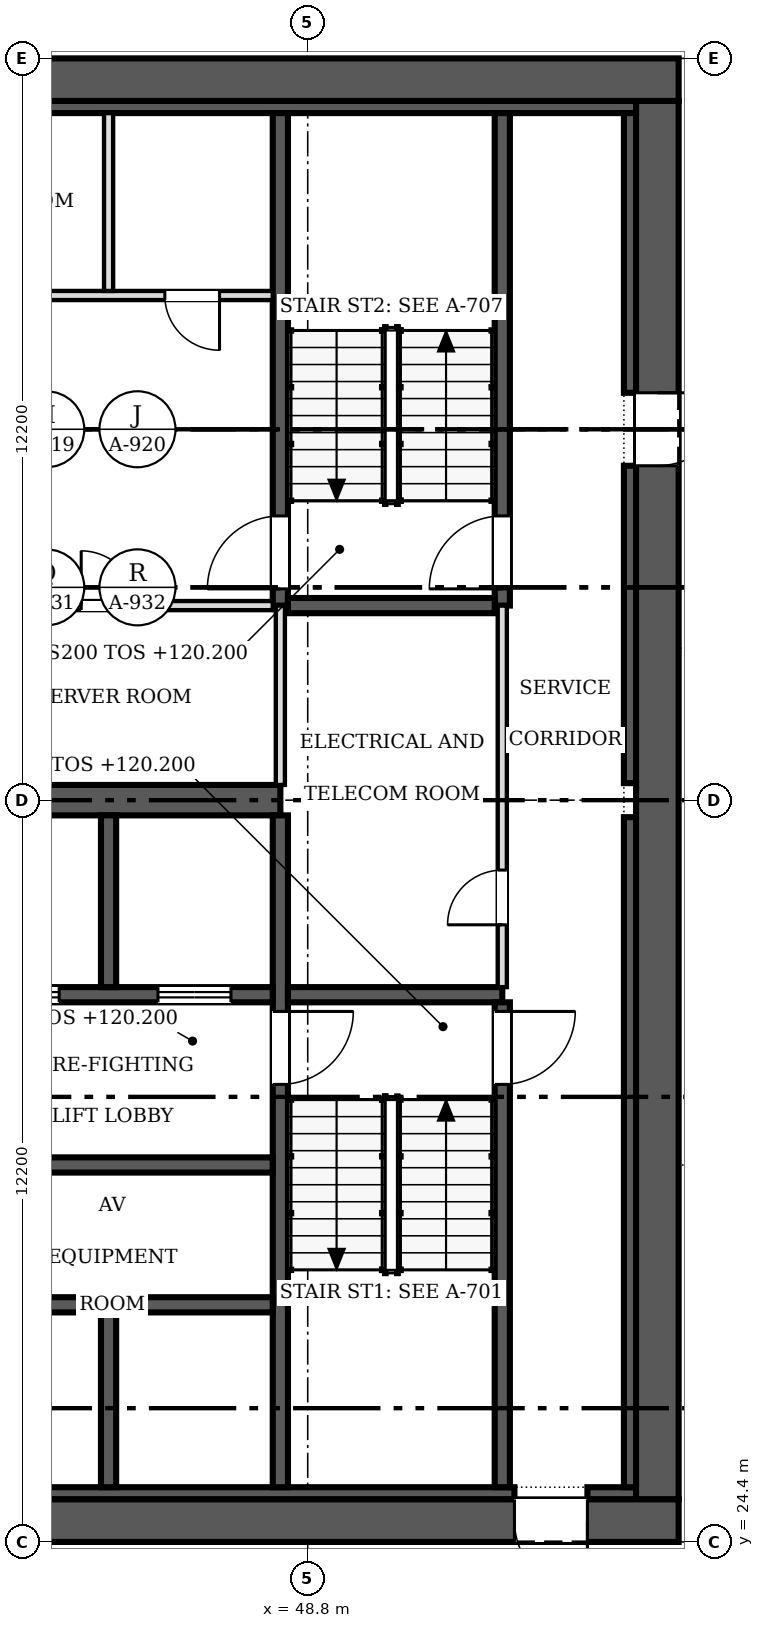
"""IFC4 building model, lengths in metres.
Left out: names, types, materials, properties, quantities, classifications, styles, units other than length and angle.
Written with IfcOpenShell. Run it as: python <this file> out.ifc"""

import sys

from ifc_helpers import new_model, si_unit, direction, frame, frame_2d, origin, place, context, subcontext, project, spatial, rectangle, extrude, source, transform, mapped, element, fill, save


model = new_model("IFC4")
c1 = context("Model", 3, precision=1e-05, world=origin(), true_north=direction((0.0, 1.0)))
c2 = subcontext(c1, "Body", "Model", "MODEL_VIEW")
j1 = project(units=[si_unit("LENGTHUNIT", "METRE"), si_unit("PLANEANGLEUNIT", "RADIAN")], contexts=[c1])
p1 = place(None, origin())
s1 = spatial("IfcSite", under=j1, at=p1, CompositionType="ELEMENT")
p2 = place(p1, origin())
s2 = spatial("IfcBuilding", under=s1, at=p2, CompositionType="ELEMENT")
p3 = place(p2, frame((0.0, 0.0, 120.2)))
s3 = spatial("IfcBuildingStorey", under=s2, at=p3, CompositionType="ELEMENT", Elevation=120.2)
p4 = place(p3, frame((54.9, 24.75, 0.0), z_axis=(0.0, 0.0, 1.0), x_axis=(-1.0, 0.0, 0.0)))
e1 = element("IfcWall", 1, at=p4, inside=s3, PredefinedType="SHEAR", context=c2, shape_type="SweptSolid", body=[
    extrude(rectangle(XDim=24.4, YDim=0.7, at=frame_2d((12.2, 0.0))), origin(), (0.0, 0.0, 1.0), 3.8),
])
m1 = source(origin(), c2, "Body", "SweptSolid", [
    extrude(rectangle(XDim=1.2, YDim=2.1, at=frame_2d((0.6, 1.05))), frame((0.0, 0.36, 0.0), z_axis=(0.0, -1.0, 0.0), x_axis=(1.0, 0.0, 0.0)), (0.0, 0.0, 1.0), 0.72),
])
p5 = place(p4, frame((1.5, 0.0, 0.0)))
e2 = element("IfcOpeningElement", 2, at=p5, cuts=e1, PredefinedType="OPENING", context=c2, shape_type="MappedRepresentation", body=[
    mapped(m1, transform((0.0, 0.0, 0.0), scale=1.0)),
])
p6 = place(p3, frame((30.5, 48.45, 0.0), z_axis=(0.0, 0.0, 1.0), x_axis=(1.0, 0.0, 0.0)))
e3 = element("IfcWall", 3, at=p6, inside=s3, PredefinedType="SHEAR", context=c2, shape_type="SweptSolid", body=[
    extrude(rectangle(XDim=24.4, YDim=0.7, at=frame_2d((12.2, 0.0))), origin(), (0.0, 0.0, 1.0), 3.8),
])
p7 = place(p3, frame((54.55, 48.1, 0.0), z_axis=(0.0, 0.0, 1.0), x_axis=(0.0, -1.0, 0.0)))
e4 = element("IfcWall", 4, at=p7, inside=s3, PredefinedType="SHEAR", context=c2, shape_type="SweptSolid", body=[
    extrude(rectangle(XDim=23.0, YDim=0.7, at=frame_2d((11.5, 0.0))), origin(), (0.0, 0.0, 1.0), 3.8),
])
p8 = place(p7, frame((4.8, 0.0, 0.0)))
e5 = element("IfcOpeningElement", 5, at=p8, cuts=e4, PredefinedType="OPENING", context=c2, shape_type="MappedRepresentation", body=[
    mapped(m1, transform((0.0, 0.0, 0.0), scale=1.0)),
])
p9 = place(p3, frame((31.2, 25.2, 0.0), z_axis=(0.0, 0.0, 1.0), x_axis=(1.0, 0.0, 0.0)))
e6 = element("IfcWall", 6, at=p9, inside=s3, PredefinedType="SOLIDWALL", context=c2, shape_type="SweptSolid", body=[
    extrude(rectangle(XDim=21.0, YDim=0.2, at=frame_2d((10.5, 0.0))), origin(), (0.0, 0.0, 1.0), 3.8),
])
p10 = place(p3, frame((53.4, 25.2, 0.0), z_axis=(0.0, 0.0, 1.0), x_axis=(1.0, 0.0, 0.0)))
e7 = element("IfcWall", 7, at=p10, inside=s3, PredefinedType="SOLIDWALL", context=c2, shape_type="SweptSolid", body=[
    extrude(rectangle(XDim=0.8, YDim=0.2, at=frame_2d((0.4, 0.0))), origin(), (0.0, 0.0, 1.0), 3.8),
])
p11 = place(p3, frame((31.2, 48.0, 0.0), z_axis=(0.0, 0.0, 1.0), x_axis=(1.0, 0.0, 0.0)))
e8 = element("IfcWall", 8, at=p11, inside=s3, PredefinedType="SOLIDWALL", context=c2, shape_type="SweptSolid", body=[
    extrude(rectangle(XDim=23.0, YDim=0.2, at=frame_2d((11.5, 0.0))), origin(), (0.0, 0.0, 1.0), 3.8),
])
p12 = place(p3, frame((54.1, 25.3, 0.0), z_axis=(0.0, 0.0, 1.0), x_axis=(0.0, 1.0, 0.0)))
e9 = element("IfcWall", 9, at=p12, inside=s3, PredefinedType="SOLIDWALL", context=c2, shape_type="SweptSolid", body=[
    extrude(rectangle(XDim=11.02, YDim=0.2, at=frame_2d((5.51, 0.0))), origin(), (0.0, 0.0, 1.0), 3.8),
])
p13 = place(p3, frame((54.1, 36.88, 0.0), z_axis=(0.0, 0.0, 1.0), x_axis=(0.0, 1.0, 0.0)))
e10 = element("IfcWall", 10, at=p13, inside=s3, PredefinedType="SOLIDWALL", context=c2, shape_type="SweptSolid", body=[
    extrude(rectangle(XDim=5.22, YDim=0.2, at=frame_2d((2.61, 0.0))), origin(), (0.0, 0.0, 1.0), 3.8),
])
p14 = place(p3, frame((54.1, 43.3, 0.0), z_axis=(0.0, 0.0, 1.0), x_axis=(0.0, 1.0, 0.0)))
e11 = element("IfcWall", 11, at=p14, inside=s3, PredefinedType="SOLIDWALL", context=c2, shape_type="SweptSolid", body=[
    extrude(rectangle(XDim=4.6, YDim=0.2, at=frame_2d((2.3, 0.0))), origin(), (0.0, 0.0, 1.0), 3.8),
])
p15 = place(p3, frame((31.4, 36.6, 0.0), z_axis=(0.0, 0.0, 1.0), x_axis=(1.0, 0.0, 0.0)))
e12 = element("IfcWall", 12, at=p15, inside=s3, PredefinedType="SHEAR", context=c2, shape_type="SweptSolid", body=[
    extrude(rectangle(XDim=16.95, YDim=0.5, at=frame_2d((8.475, 0.0))), origin(), (0.0, 0.0, 1.0), 3.8),
])
p16 = place(p3, frame((48.35, 36.35, 0.0), z_axis=(0.0, 0.0, 1.0), x_axis=(0.0, -1.0, 0.0)))
e13 = element("IfcWall", 13, at=p16, inside=s3, PredefinedType="SOLIDWALL", context=c2, shape_type="SweptSolid", body=[
    extrude(rectangle(XDim=11.05, YDim=0.25, at=frame_2d((5.525, 0.0))), origin(), (0.0, 0.0, 1.0), 3.8),
])
m2 = source(origin(), c2, "Body", "SweptSolid", [
    extrude(rectangle(XDim=1.2, YDim=2.1, at=frame_2d((0.6, 1.05))), frame((0.0, 0.135, 0.0), z_axis=(0.0, -1.0, 0.0), x_axis=(1.0, 0.0, 0.0)), (0.0, 0.0, 1.0), 0.27),
])
p17 = place(p16, frame((3.225, 0.0, 0.0)))
e14 = element("IfcOpeningElement", 14, at=p17, cuts=e13, PredefinedType="OPENING", context=c2, shape_type="MappedRepresentation", body=[
    mapped(m2, transform((0.0, 0.0, 0.0), scale=1.0)),
])
p18 = place(p3, frame((48.225, 33.4, 0.0), z_axis=(0.0, 0.0, 1.0), x_axis=(-1.0, 0.0, 0.0)))
e15 = element("IfcWall", 15, at=p18, inside=s3, PredefinedType="SOLIDWALL", context=c2, shape_type="SweptSolid", body=[
    extrude(rectangle(XDim=5.275, YDim=0.25, at=frame_2d((2.638, 0.0))), origin(), (0.0, 0.0, 1.0), 3.8),
])
p19 = place(p18, frame((3.512, 0.0, 0.0)))
e16 = element("IfcOpeningElement", 16, at=p19, cuts=e15, PredefinedType="OPENING", context=c2, shape_type="MappedRepresentation", body=[
    mapped(m2, transform((0.0, 0.0, 0.0), scale=1.0)),
])
p20 = place(p18, frame((0.688, 0.0, 0.0)))
e17 = element("IfcOpeningElement", 17, at=p20, cuts=e15, PredefinedType="OPENING", context=c2, shape_type="MappedRepresentation", body=[
    mapped(m2, transform((0.0, 0.0, 0.0), scale=1.0)),
])
p21 = place(p3, frame((48.475, 33.4, 0.0), z_axis=(0.0, 0.0, 1.0), x_axis=(1.0, 0.0, 0.0)))
e18 = element("IfcWall", 18, at=p21, inside=s3, PredefinedType="SOLIDWALL", context=c2, shape_type="SweptSolid", body=[
    extrude(rectangle(XDim=3.525, YDim=0.25, at=frame_2d((1.762, 0.0))), origin(), (0.0, 0.0, 1.0), 3.8),
])
p22 = place(p3, frame((48.35, 47.9, 0.0), z_axis=(0.0, 0.0, 1.0), x_axis=(0.0, -1.0, 0.0)))
e19 = element("IfcWall", 19, at=p22, inside=s3, PredefinedType="SOLIDWALL", context=c2, shape_type="SweptSolid", body=[
    extrude(rectangle(XDim=8.1, YDim=0.25, at=frame_2d((4.05, 0.0))), origin(), (0.0, 0.0, 1.0), 3.8),
])
p23 = place(p22, frame((6.625, 0.0, 0.0)))
e20 = element("IfcOpeningElement", 20, at=p23, cuts=e19, PredefinedType="OPENING", context=c2, shape_type="MappedRepresentation", body=[
    mapped(m2, transform((0.0, 0.0, 0.0), scale=1.0)),
])
p24 = place(p3, frame((52.0, 25.3, 0.0), z_axis=(0.0, 0.0, 1.0), x_axis=(0.0, 1.0, 0.0)))
e21 = element("IfcWall", 21, at=p24, inside=s3, PredefinedType="SOLIDWALL", context=c2, shape_type="SweptSolid", body=[
    extrude(rectangle(XDim=7.975, YDim=0.25, at=frame_2d((3.987, 0.0))), origin(), (0.0, 0.0, 1.0), 3.8),
])
p25 = place(p24, frame((6.625, 0.0, 0.0)))
e22 = element("IfcOpeningElement", 22, at=p25, cuts=e21, PredefinedType="OPENING", context=c2, shape_type="MappedRepresentation", body=[
    mapped(m2, transform((0.0, 0.0, 0.0), scale=1.0)),
])
p26 = place(p3, frame((52.0, 39.8, 0.0), z_axis=(0.0, 0.0, 1.0), x_axis=(0.0, 1.0, 0.0)))
e23 = element("IfcWall", 23, at=p26, inside=s3, PredefinedType="SOLIDWALL", context=c2, shape_type="SweptSolid", body=[
    extrude(rectangle(XDim=8.1, YDim=0.25, at=frame_2d((4.05, 0.0))), origin(), (0.0, 0.0, 1.0), 3.8),
])
p27 = place(p26, frame((0.275, 0.0, 0.0)))
e24 = element("IfcOpeningElement", 24, at=p27, cuts=e23, PredefinedType="OPENING", context=c2, shape_type="MappedRepresentation", body=[
    mapped(m2, transform((0.0, 0.0, 0.0), scale=1.0)),
])
for number, where, z_axis, x_axis in (
    (25, (42.95, 28.3, 0.0), (0.0, 0.0, 1.0), (1.0, 0.0, 0.0)),
    (26, (42.95, 30.6, 0.0), (0.0, 0.0, 1.0), (1.0, 0.0, 0.0)),
):
    element("IfcWall", number, at=place(p3, frame(where, z_axis=z_axis, x_axis=x_axis)), inside=s3, PredefinedType="SOLIDWALL", context=c2, shape_type="SweptSolid", body=[
        extrude(rectangle(XDim=5.275, YDim=0.25, at=frame_2d((2.638, 0.0))), origin(), (0.0, 0.0, 1.0), 3.8),
    ])
p28 = place(p3, frame((48.475, 39.8, 0.0), z_axis=(0.0, 0.0, 1.0), x_axis=(1.0, 0.0, 0.0)))
e27 = element("IfcWall", 27, at=p28, inside=s3, PredefinedType="SOLIDWALL", context=c2, shape_type="SweptSolid", body=[
    extrude(rectangle(XDim=3.4, YDim=0.25, at=frame_2d((1.7, 0.0))), origin(), (0.0, 0.0, 1.0), 3.8),
])
p29 = place(p3, frame((45.525, 33.525, 0.0), z_axis=(0.0, 0.0, 1.0), x_axis=(0.0, 1.0, 0.0)))
e28 = element("IfcWall", 28, at=p29, inside=s3, PredefinedType="SOLIDWALL", context=c2, shape_type="SweptSolid", body=[
    extrude(rectangle(XDim=2.825, YDim=0.25, at=frame_2d((1.413, 0.0))), origin(), (0.0, 0.0, 1.0), 3.8),
])
p30 = place(p3, frame((45.525, 25.3, 0.0), z_axis=(0.0, 0.0, 1.0), x_axis=(0.0, 1.0, 0.0)))
e29 = element("IfcWall", 29, at=p30, inside=s3, PredefinedType="SOLIDWALL", context=c2, shape_type="SweptSolid", body=[
    extrude(rectangle(XDim=2.875, YDim=0.25, at=frame_2d((1.438, 0.0))), origin(), (0.0, 0.0, 1.0), 3.8),
])
p31 = place(p3, frame((52.0, 33.525, 0.0), z_axis=(0.0, 0.0, 1.0), x_axis=(0.0, 1.0, 0.0)))
e30 = element("IfcWall", 30, at=p31, inside=s3, PredefinedType="PARTITIONING", context=c2, shape_type="SweptSolid", body=[
    extrude(rectangle(XDim=6.275, YDim=0.15, at=frame_2d((3.138, 0.0))), origin(), (0.0, 0.0, 1.0), 3.6),
])
m3 = source(origin(), c2, "Body", "SweptSolid", [
    extrude(rectangle(XDim=0.9, YDim=2.1, at=frame_2d((0.45, 1.05))), frame((0.0, 0.085, 0.0), z_axis=(0.0, -1.0, 0.0), x_axis=(1.0, 0.0, 0.0)), (0.0, 0.0, 1.0), 0.17),
])
p32 = place(p31, frame((1.025, 0.0, 0.0)))
e31 = element("IfcOpeningElement", 31, at=p32, cuts=e30, PredefinedType="OPENING", context=c2, shape_type="MappedRepresentation", body=[
    mapped(m3, transform((0.0, 0.0, 0.0), scale=1.0)),
])
p33 = place(p3, frame((48.225, 39.8, 0.0), z_axis=(0.0, 0.0, 1.0), x_axis=(-1.0, 0.0, 0.0)))
e32 = element("IfcWall", 32, at=p33, inside=s3, PredefinedType="PARTITIONING", context=c2, shape_type="SweptSolid", body=[
    extrude(rectangle(XDim=5.275, YDim=0.15, at=frame_2d((2.638, 0.0))), origin(), (0.0, 0.0, 1.0), 3.6),
])
p34 = place(p33, frame((2.25, 0.0, 0.0)))
e33 = element("IfcOpeningElement", 33, at=p34, cuts=e32, PredefinedType="OPENING", context=c2, shape_type="MappedRepresentation", body=[
    mapped(m3, transform((0.0, 0.0, 0.0), scale=1.0)),
])
p35 = place(p3, frame((42.95, 44.9, 0.0), z_axis=(0.0, 0.0, 1.0), x_axis=(1.0, 0.0, 0.0)))
e34 = element("IfcWall", 34, at=p35, inside=s3, PredefinedType="PARTITIONING", context=c2, shape_type="SweptSolid", body=[
    extrude(rectangle(XDim=5.275, YDim=0.15, at=frame_2d((2.638, 0.0))), origin(), (0.0, 0.0, 1.0), 3.6),
])
p36 = place(p35, frame((0.712, 0.0, 0.0)))
e35 = element("IfcOpeningElement", 35, at=p36, cuts=e34, PredefinedType="OPENING", context=c2, shape_type="MappedRepresentation", body=[
    mapped(m3, transform((0.0, 0.0, 0.0), scale=1.0)),
])
p37 = place(p35, frame((3.5, 0.0, 0.0)))
e36 = element("IfcOpeningElement", 36, at=p37, cuts=e34, PredefinedType="OPENING", context=c2, shape_type="MappedRepresentation", body=[
    mapped(m3, transform((0.0, 0.0, 0.0), scale=1.0)),
])
p38 = place(p3, frame((48.35, 36.85, 0.0), z_axis=(0.0, 0.0, 1.0), x_axis=(0.0, 1.0, 0.0)))
e37 = element("IfcWall", 37, at=p38, inside=s3, PredefinedType="PARTITIONING", context=c2, shape_type="SweptSolid", body=[
    extrude(rectangle(XDim=2.95, YDim=0.15, at=frame_2d((1.475, 0.0))), origin(), (0.0, 0.0, 1.0), 3.6),
])
p39 = place(p3, frame((45.525, 44.975, 0.0), z_axis=(0.0, 0.0, 1.0), x_axis=(0.0, 1.0, 0.0)))
e38 = element("IfcWall", 38, at=p39, inside=s3, PredefinedType="PARTITIONING", context=c2, shape_type="SweptSolid", body=[
    extrude(rectangle(XDim=2.925, YDim=0.15, at=frame_2d((1.462, 0.0))), origin(), (0.0, 0.0, 1.0), 3.6),
])
m4 = source(origin(), c2, "Body", "SweptSolid", [
    extrude(rectangle(XDim=1.2, YDim=2.1, at=frame_2d((0.6, 1.05))), frame((0.0, 0.025, 0.0), z_axis=(0.0, -1.0, 0.0), x_axis=(1.0, 0.0, 0.0)), (0.0, 0.0, 1.0), 0.05),
])
p40 = place(p5, origin())
e39 = element("IfcDoor", 39, at=p40, inside=s3, OperationType="SINGLE_SWING_LEFT", PredefinedType="DOOR", context=c2, shape_type="MappedRepresentation", body=[
    mapped(m4, transform((0.0, 0.0, 0.0), scale=1.0)),
])
fill(e2, e39)
p41 = place(p8, origin())
e40 = element("IfcDoor", 40, at=p41, inside=s3, OperationType="SINGLE_SWING_LEFT", PredefinedType="DOOR", context=c2, shape_type="MappedRepresentation", body=[
    mapped(m4, transform((0.0, 0.0, 0.0), scale=1.0)),
])
fill(e5, e40)
p42 = place(p17, origin())
e41 = element("IfcDoor", 41, at=p42, inside=s3, OperationType="SINGLE_SWING_LEFT", PredefinedType="DOOR", context=c2, shape_type="MappedRepresentation", body=[
    mapped(m4, transform((0.0, 0.0, 0.0), scale=1.0)),
])
fill(e14, e41)
p43 = place(p19, origin())
e42 = element("IfcDoor", 42, at=p43, inside=s3, OperationType="DOUBLE_DOOR_SLIDING", PredefinedType="DOOR", context=c2, shape_type="MappedRepresentation", body=[
    mapped(m4, transform((0.0, 0.0, 0.0), scale=1.0)),
])
fill(e16, e42)
p44 = place(p20, origin())
e43 = element("IfcDoor", 43, at=p44, inside=s3, OperationType="DOUBLE_DOOR_SLIDING", PredefinedType="DOOR", context=c2, shape_type="MappedRepresentation", body=[
    mapped(m4, transform((0.0, 0.0, 0.0), scale=1.0)),
])
fill(e17, e43)
p45 = place(p23, origin())
e44 = element("IfcDoor", 44, at=p45, inside=s3, OperationType="SINGLE_SWING_RIGHT", PredefinedType="DOOR", context=c2, shape_type="MappedRepresentation", body=[
    mapped(m4, transform((0.0, 0.0, 0.0), scale=1.0)),
])
fill(e20, e44)
p46 = place(p25, origin())
e45 = element("IfcDoor", 45, at=p46, inside=s3, OperationType="SINGLE_SWING_RIGHT", PredefinedType="DOOR", context=c2, shape_type="MappedRepresentation", body=[
    mapped(m4, transform((0.0, 0.0, 0.0), scale=1.0)),
])
fill(e22, e45)
p47 = place(p27, origin())
e46 = element("IfcDoor", 46, at=p47, inside=s3, OperationType="SINGLE_SWING_LEFT", PredefinedType="DOOR", context=c2, shape_type="MappedRepresentation", body=[
    mapped(m4, transform((0.0, 0.0, 0.0), scale=1.0)),
])
fill(e24, e46)
m5 = source(origin(), c2, "Body", "SweptSolid", [
    extrude(rectangle(XDim=0.9, YDim=2.1, at=frame_2d((0.45, 1.05))), frame((0.0, 0.025, 0.0), z_axis=(0.0, -1.0, 0.0), x_axis=(1.0, 0.0, 0.0)), (0.0, 0.0, 1.0), 0.05),
])
p48 = place(p32, origin())
e47 = element("IfcDoor", 47, at=p48, inside=s3, OperationType="SINGLE_SWING_LEFT", PredefinedType="DOOR", context=c2, shape_type="MappedRepresentation", body=[
    mapped(m5, transform((0.0, 0.0, 0.0), scale=1.0)),
])
fill(e31, e47)
p49 = place(p34, origin())
e48 = element("IfcDoor", 48, at=p49, inside=s3, OperationType="SINGLE_SWING_RIGHT", PredefinedType="DOOR", context=c2, shape_type="MappedRepresentation", body=[
    mapped(m5, transform((0.0, 0.0, 0.0), scale=1.0)),
])
fill(e33, e48)
p50 = place(p37, origin())
e49 = element("IfcDoor", 49, at=p50, inside=s3, OperationType="SINGLE_SWING_RIGHT", PredefinedType="DOOR", context=c2, shape_type="MappedRepresentation", body=[
    mapped(m5, transform((0.0, 0.0, 0.0), scale=1.0)),
])
fill(e36, e49)
save(model, sys.argv[1])
